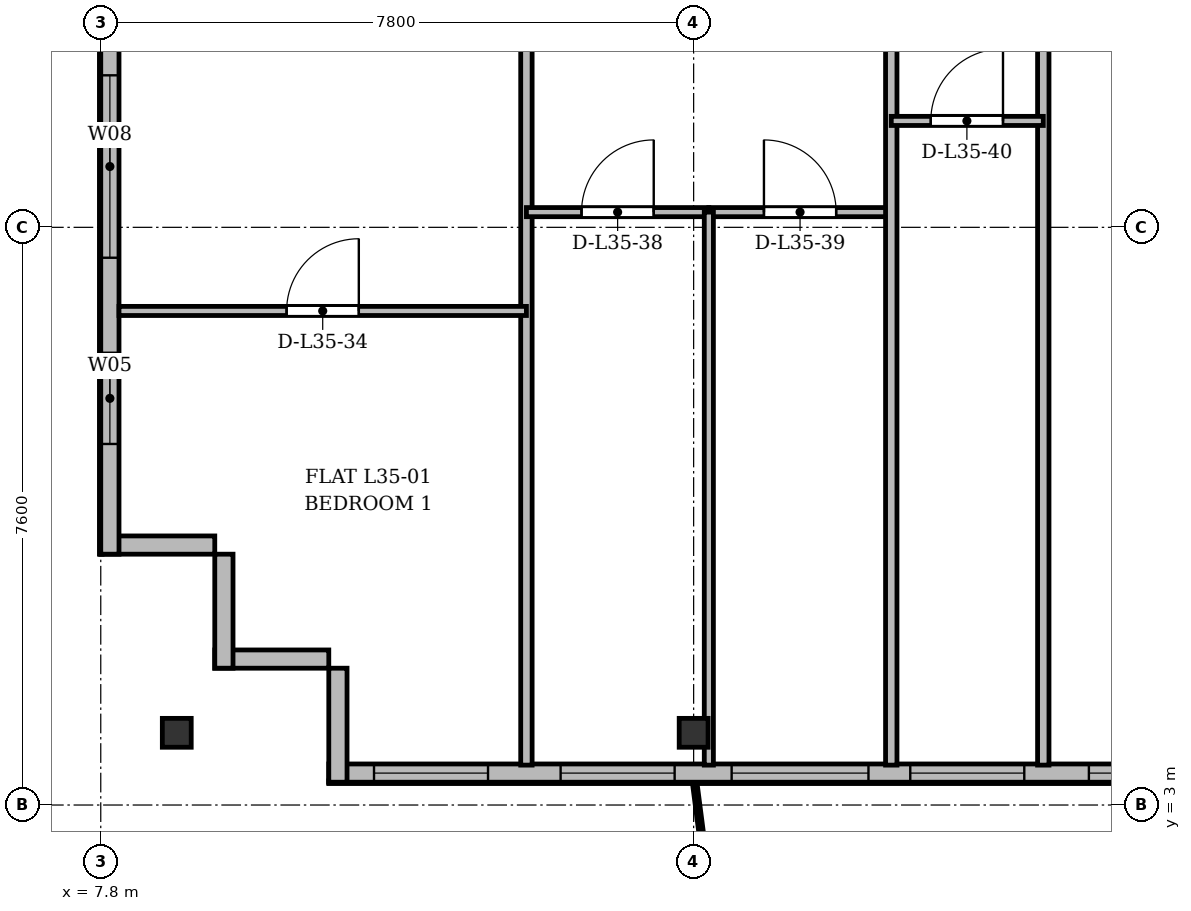
"""IFC4 building model, lengths in metres.
Left out: names, types, materials, properties, quantities, classifications, styles, units other than length and angle.
Written with IfcOpenShell. Run it as: python <this file> out.ifc"""

import sys

from ifc_helpers import new_model, si_unit, direction, frame, frame_2d, origin, origin_2d, place, context, subcontext, project, spatial, rectangle, i_section, extrude, source, transform, mapped, element, fill, save


model = new_model("IFC4")
c1 = context("Model", 3, precision=1e-05, world=origin(), true_north=direction((0.0, 1.0)))
c2 = subcontext(c1, "Body", "Model", "MODEL_VIEW")
j1 = project(units=[si_unit("LENGTHUNIT", "METRE"), si_unit("PLANEANGLEUNIT", "RADIAN")], contexts=[c1])
p1 = place(None, origin())
s1 = spatial("IfcSite", under=j1, at=p1, CompositionType="ELEMENT")
p2 = place(p1, origin())
s2 = spatial("IfcBuilding", under=s1, at=p2, CompositionType="ELEMENT")
p3 = place(p2, frame((0.0, 0.0, 135.7)))
s3 = spatial("IfcBuildingStorey", under=s2, at=p3, CompositionType="ELEMENT", Elevation=135.7)
m1 = source(origin(), c2, "Body", "SweptSolid", [
    extrude(i_section(OverallWidth=0.38, OverallDepth=0.38, WebThickness=0.02, FlangeThickness=0.03, at=origin_2d()), origin(), (0.0, 0.0, 1.0), 3.6),
])
for number, where, z_axis, x_axis in (
    (1, (8.8, 3.95, 0.0), (0.0, 0.0, 1.0), (1.0, 0.0, 0.0)),
    (2, (15.6, 3.95, 0.0), (0.0, 0.0, 1.0), (1.0, 0.0, 0.0)),
):
    element("IfcColumn", number, at=place(p3, frame(where, z_axis=z_axis, x_axis=x_axis)), inside=s3, PredefinedType="COLUMN", context=c2, shape_type="MappedRepresentation", body=[
        mapped(m1, transform((0.0, 0.0, 0.0), x_axis=(1.0, 0.0, 0.0), y_axis=(0.0, 1.0, 0.0), z_axis=(0.0, 0.0, 1.0), scale=1.0)),
    ])
for number, where, z_axis, x_axis in (
    (3, (10.8, 4.92, 0.0), (0.0, 0.0, 1.0), (-1.0, 0.0, 0.0)),
    (4, (9.42, 4.8, 0.0), (0.0, 0.0, 1.0), (0.0, 1.0, 0.0)),
):
    element("IfcWall", number, at=place(p3, frame(where, z_axis=z_axis, x_axis=x_axis)), inside=s3, PredefinedType="SOLIDWALL", context=c2, shape_type="SweptSolid", body=[
        extrude(rectangle(XDim=1.5, YDim=0.24, at=frame_2d((0.75, 0.0))), origin(), (0.0, 0.0, 1.0), 3.35),
    ])
p4 = place(p3, frame((9.3, 6.42, 0.0), z_axis=(0.0, 0.0, 1.0), x_axis=(-1.0, 0.0, 0.0)))
e5 = element("IfcWall", 5, at=p4, inside=s3, PredefinedType="SOLIDWALL", context=c2, shape_type="SweptSolid", body=[
    extrude(rectangle(XDim=1.5, YDim=0.24, at=frame_2d((0.75, 0.0))), origin(), (0.0, 0.0, 1.0), 2.85),
])
p5 = place(p3, frame((7.92, 6.3, 0.0), z_axis=(0.0, 0.0, 1.0), x_axis=(0.0, 1.0, 0.0)))
e6 = element("IfcWall", 6, at=p5, inside=s3, PredefinedType="SOLIDWALL", context=c2, shape_type="SweptSolid", body=[
    extrude(rectangle(XDim=39.2, YDim=0.24, at=frame_2d((19.6, 0.0))), origin(), (0.0, 0.0, 1.0), 3.35),
])
p6 = place(p5, frame((1.45, 0.0, 0.92)))
e7 = element("IfcOpeningElement", 7, at=p6, cuts=e6, PredefinedType="OPENING", context=c2, shape_type="SweptSolid", body=[
    extrude(rectangle(XDim=1.2, YDim=1.65, at=frame_2d((0.6, 0.825))), frame((0.0, 0.13, 0.0), z_axis=(0.0, -1.0, 0.0), x_axis=(1.0, 0.0, 0.0)), (0.0, 0.0, 1.0), 0.26),
])
p7 = place(p5, frame((3.9, 0.0, 0.92)))
e8 = element("IfcOpeningElement", 8, at=p7, cuts=e6, PredefinedType="OPENING", context=c2, shape_type="SweptSolid", body=[
    extrude(rectangle(XDim=2.4, YDim=2.1, at=frame_2d((1.2, 1.05))), frame((0.0, 0.13, 0.0), z_axis=(0.0, -1.0, 0.0), x_axis=(1.0, 0.0, 0.0)), (0.0, 0.0, 1.0), 0.26),
])
p8 = place(p5, frame((8.1, 0.0, 0.92)))
e9 = element("IfcOpeningElement", 9, at=p8, cuts=e6, PredefinedType="OPENING", context=c2, shape_type="SweptSolid", body=[
    extrude(rectangle(XDim=2.4, YDim=2.1, at=frame_2d((1.2, 1.05))), frame((0.0, 0.13, 0.0), z_axis=(0.0, -1.0, 0.0), x_axis=(1.0, 0.0, 0.0)), (0.0, 0.0, 1.0), 0.26),
])
p9 = place(p5, frame((15.3, 0.0, 0.92)))
e10 = element("IfcOpeningElement", 10, at=p9, cuts=e6, PredefinedType="OPENING", context=c2, shape_type="SweptSolid", body=[
    extrude(rectangle(XDim=2.4, YDim=2.1, at=frame_2d((1.2, 1.05))), frame((0.0, 0.13, 0.0), z_axis=(0.0, -1.0, 0.0), x_axis=(1.0, 0.0, 0.0)), (0.0, 0.0, 1.0), 0.26),
])
p10 = place(p5, frame((33.5, 0.0, 0.92)))
e11 = element("IfcOpeningElement", 11, at=p10, cuts=e6, PredefinedType="OPENING", context=c2, shape_type="SweptSolid", body=[
    extrude(rectangle(XDim=1.2, YDim=1.65, at=frame_2d((0.6, 0.825))), frame((0.0, 0.13, 0.0), z_axis=(0.0, -1.0, 0.0), x_axis=(1.0, 0.0, 0.0)), (0.0, 0.0, 1.0), 0.26),
])
p11 = place(p5, frame((36.85, 0.0, 0.92)))
e12 = element("IfcOpeningElement", 12, at=p11, cuts=e6, PredefinedType="OPENING", context=c2, shape_type="SweptSolid", body=[
    extrude(rectangle(XDim=1.2, YDim=1.65, at=frame_2d((0.6, 0.825))), frame((0.0, 0.13, 0.0), z_axis=(0.0, -1.0, 0.0), x_axis=(1.0, 0.0, 0.0)), (0.0, 0.0, 1.0), 0.26),
])
p12 = place(p3, frame((63.6, 3.42, 0.0), z_axis=(0.0, 0.0, 1.0), x_axis=(-1.0, 0.0, 0.0)))
e13 = element("IfcWall", 13, at=p12, inside=s3, PredefinedType="SOLIDWALL", context=c2, shape_type="SweptSolid", body=[
    extrude(rectangle(XDim=52.8, YDim=0.24, at=frame_2d((26.4, 0.0))), origin(), (0.0, 0.0, 1.0), 3.35),
])
p13 = place(p12, frame((0.345, 0.0, 0.9)))
e14 = element("IfcOpeningElement", 14, at=p13, cuts=e13, PredefinedType="OPENING", context=c2, shape_type="SweptSolid", body=[
    extrude(rectangle(XDim=1.8, YDim=1.8, at=frame_2d((0.9, 0.9))), frame((0.0, 0.13, 0.0), z_axis=(0.0, -1.0, 0.0), x_axis=(1.0, 0.0, 0.0)), (0.0, 0.0, 1.0), 0.26),
])
p14 = place(p12, frame((2.9, 0.0, 0.9)))
e15 = element("IfcOpeningElement", 15, at=p14, cuts=e13, PredefinedType="OPENING", context=c2, shape_type="SweptSolid", body=[
    extrude(rectangle(XDim=1.5, YDim=1.75, at=frame_2d((0.75, 0.875))), frame((0.0, 0.13, 0.0), z_axis=(0.0, -1.0, 0.0), x_axis=(1.0, 0.0, 0.0)), (0.0, 0.0, 1.0), 0.26),
])
p15 = place(p12, frame((5.902, 0.0, 0.0)))
e16 = element("IfcOpeningElement", 16, at=p15, cuts=e13, PredefinedType="OPENING", context=c2, shape_type="SweptSolid", body=[
    extrude(rectangle(XDim=1.2, YDim=2.2, at=frame_2d((0.6, 1.1))), frame((0.0, 0.13, 0.0), z_axis=(0.0, -1.0, 0.0), x_axis=(1.0, 0.0, 0.0)), (0.0, 0.0, 1.0), 0.26),
])
p16 = place(p12, frame((7.65, 0.0, 0.9)))
e17 = element("IfcOpeningElement", 17, at=p16, cuts=e13, PredefinedType="OPENING", context=c2, shape_type="SweptSolid", body=[
    extrude(rectangle(XDim=1.5, YDim=1.75, at=frame_2d((0.75, 0.875))), frame((0.0, 0.13, 0.0), z_axis=(0.0, -1.0, 0.0), x_axis=(1.0, 0.0, 0.0)), (0.0, 0.0, 1.0), 0.26),
])
p17 = place(p12, frame((10.175, 0.0, 0.9)))
e18 = element("IfcOpeningElement", 18, at=p17, cuts=e13, PredefinedType="OPENING", context=c2, shape_type="SweptSolid", body=[
    extrude(rectangle(XDim=1.65, YDim=1.85, at=frame_2d((0.825, 0.925))), frame((0.0, 0.13, 0.0), z_axis=(0.0, -1.0, 0.0), x_axis=(1.0, 0.0, 0.0)), (0.0, 0.0, 1.0), 0.26),
])
p18 = place(p12, frame((12.9, 0.0, 0.9)))
e19 = element("IfcOpeningElement", 19, at=p18, cuts=e13, PredefinedType="OPENING", context=c2, shape_type="SweptSolid", body=[
    extrude(rectangle(XDim=1.8, YDim=1.8, at=frame_2d((0.9, 0.9))), frame((0.0, 0.13, 0.0), z_axis=(0.0, -1.0, 0.0), x_axis=(1.0, 0.0, 0.0)), (0.0, 0.0, 1.0), 0.26),
])
p19 = place(p12, frame((15.45, 0.0, 0.9)))
e20 = element("IfcOpeningElement", 20, at=p19, cuts=e13, PredefinedType="OPENING", context=c2, shape_type="SweptSolid", body=[
    extrude(rectangle(XDim=1.5, YDim=1.75, at=frame_2d((0.75, 0.875))), frame((0.0, 0.13, 0.0), z_axis=(0.0, -1.0, 0.0), x_axis=(1.0, 0.0, 0.0)), (0.0, 0.0, 1.0), 0.26),
])
p20 = place(p12, frame((17.85, 0.0, 0.9)))
e21 = element("IfcOpeningElement", 21, at=p20, cuts=e13, PredefinedType="OPENING", context=c2, shape_type="SweptSolid", body=[
    extrude(rectangle(XDim=1.5, YDim=1.75, at=frame_2d((0.75, 0.875))), frame((0.0, 0.13, 0.0), z_axis=(0.0, -1.0, 0.0), x_axis=(1.0, 0.0, 0.0)), (0.0, 0.0, 1.0), 0.26),
])
p21 = place(p12, frame((20.45, 0.0, 0.9)))
e22 = element("IfcOpeningElement", 22, at=p21, cuts=e13, PredefinedType="OPENING", context=c2, shape_type="SweptSolid", body=[
    extrude(rectangle(XDim=2.0, YDim=1.95, at=frame_2d((1.0, 0.975))), frame((0.0, 0.13, 0.0), z_axis=(0.0, -1.0, 0.0), x_axis=(1.0, 0.0, 0.0)), (0.0, 0.0, 1.0), 0.26),
])
p22 = place(p12, frame((23.925, 0.0, 0.9)))
e23 = element("IfcOpeningElement", 23, at=p22, cuts=e13, PredefinedType="OPENING", context=c2, shape_type="SweptSolid", body=[
    extrude(rectangle(XDim=1.65, YDim=1.85, at=frame_2d((0.825, 0.925))), frame((0.0, 0.13, 0.0), z_axis=(0.0, -1.0, 0.0), x_axis=(1.0, 0.0, 0.0)), (0.0, 0.0, 1.0), 0.26),
])
p23 = place(p12, frame((28.8, 0.0, 0.9)))
e24 = element("IfcOpeningElement", 24, at=p23, cuts=e13, PredefinedType="OPENING", context=c2, shape_type="SweptSolid", body=[
    extrude(rectangle(XDim=1.8, YDim=1.8, at=frame_2d((0.9, 0.9))), frame((0.0, 0.13, 0.0), z_axis=(0.0, -1.0, 0.0), x_axis=(1.0, 0.0, 0.0)), (0.0, 0.0, 1.0), 0.26),
])
p24 = place(p12, frame((34.478, 0.0, 0.0)))
e25 = element("IfcOpeningElement", 25, at=p24, cuts=e13, PredefinedType="OPENING", context=c2, shape_type="SweptSolid", body=[
    extrude(rectangle(XDim=1.2, YDim=2.2, at=frame_2d((0.6, 1.1))), frame((0.0, 0.13, 0.0), z_axis=(0.0, -1.0, 0.0), x_axis=(1.0, 0.0, 0.0)), (0.0, 0.0, 1.0), 0.26),
])
p25 = place(p12, frame((37.65, 0.0, 0.9)))
e26 = element("IfcOpeningElement", 26, at=p25, cuts=e13, PredefinedType="OPENING", context=c2, shape_type="SweptSolid", body=[
    extrude(rectangle(XDim=1.5, YDim=1.75, at=frame_2d((0.75, 0.875))), frame((0.0, 0.13, 0.0), z_axis=(0.0, -1.0, 0.0), x_axis=(1.0, 0.0, 0.0)), (0.0, 0.0, 1.0), 0.26),
])
p26 = place(p12, frame((40.8, 0.0, 0.9)))
e27 = element("IfcOpeningElement", 27, at=p26, cuts=e13, PredefinedType="OPENING", context=c2, shape_type="SweptSolid", body=[
    extrude(rectangle(XDim=2.0, YDim=1.95, at=frame_2d((1.0, 0.975))), frame((0.0, 0.13, 0.0), z_axis=(0.0, -1.0, 0.0), x_axis=(1.0, 0.0, 0.0)), (0.0, 0.0, 1.0), 0.26),
])
p27 = place(p12, frame((43.65, 0.0, 0.9)))
e28 = element("IfcOpeningElement", 28, at=p27, cuts=e13, PredefinedType="OPENING", context=c2, shape_type="SweptSolid", body=[
    extrude(rectangle(XDim=1.5, YDim=1.75, at=frame_2d((0.75, 0.875))), frame((0.0, 0.13, 0.0), z_axis=(0.0, -1.0, 0.0), x_axis=(1.0, 0.0, 0.0)), (0.0, 0.0, 1.0), 0.26),
])
p28 = place(p12, frame((45.7, 0.0, 0.9)))
e29 = element("IfcOpeningElement", 29, at=p28, cuts=e13, PredefinedType="OPENING", context=c2, shape_type="SweptSolid", body=[
    extrude(rectangle(XDim=1.8, YDim=1.8, at=frame_2d((0.9, 0.9))), frame((0.0, 0.13, 0.0), z_axis=(0.0, -1.0, 0.0), x_axis=(1.0, 0.0, 0.0)), (0.0, 0.0, 1.0), 0.26),
])
p29 = place(p12, frame((48.25, 0.0, 0.9)))
e30 = element("IfcOpeningElement", 30, at=p29, cuts=e13, PredefinedType="OPENING", context=c2, shape_type="SweptSolid", body=[
    extrude(rectangle(XDim=1.5, YDim=1.75, at=frame_2d((0.75, 0.875))), frame((0.0, 0.13, 0.0), z_axis=(0.0, -1.0, 0.0), x_axis=(1.0, 0.0, 0.0)), (0.0, 0.0, 1.0), 0.26),
])
p30 = place(p12, frame((50.705, 0.0, 0.9)))
e31 = element("IfcOpeningElement", 31, at=p30, cuts=e13, PredefinedType="OPENING", context=c2, shape_type="SweptSolid", body=[
    extrude(rectangle(XDim=1.5, YDim=1.75, at=frame_2d((0.75, 0.875))), frame((0.0, 0.13, 0.0), z_axis=(0.0, -1.0, 0.0), x_axis=(1.0, 0.0, 0.0)), (0.0, 0.0, 1.0), 0.26),
])
p31 = place(p3, frame((10.92, 3.3, 0.0), z_axis=(0.0, 0.0, 1.0), x_axis=(0.0, 1.0, 0.0)))
e32 = element("IfcWall", 32, at=p31, inside=s3, PredefinedType="SOLIDWALL", context=c2, shape_type="SweptSolid", body=[
    extrude(rectangle(XDim=1.5, YDim=0.24, at=frame_2d((0.75, 0.0))), origin(), (0.0, 0.0, 1.0), 2.75),
])
p32 = place(p3, frame((13.4, 3.525, 0.0), z_axis=(0.0, 0.0, 1.0), x_axis=(0.0, 1.0, 0.0)))
e33 = element("IfcWall", 33, at=p32, inside=s3, PredefinedType="PARTITIONING", context=c2, shape_type="SweptSolid", body=[
    extrude(rectangle(XDim=27.275, YDim=0.15, at=frame_2d((13.638, 0.0))), origin(), (0.0, 0.0, 1.0), 2.75),
])
p33 = place(p3, frame((8.04, 9.5, 0.0), z_axis=(0.0, 0.0, 1.0), x_axis=(1.0, 0.0, 0.0)))
e34 = element("IfcWall", 34, at=p33, inside=s3, PredefinedType="PARTITIONING", context=c2, shape_type="SweptSolid", body=[
    extrude(rectangle(XDim=5.36, YDim=0.12, at=frame_2d((2.68, 0.0))), origin(), (0.0, 0.0, 1.0), 2.85),
])
p34 = place(p33, frame((2.205, 0.0, 0.0)))
e35 = element("IfcOpeningElement", 35, at=p34, cuts=e34, PredefinedType="OPENING", context=c2, shape_type="SweptSolid", body=[
    extrude(rectangle(XDim=0.95, YDim=2.15, at=frame_2d((0.475, 1.075))), frame((0.0, 0.07, 0.0), z_axis=(0.0, -1.0, 0.0), x_axis=(1.0, 0.0, 0.0)), (0.0, 0.0, 1.0), 0.14),
])
p35 = place(p3, frame((13.4, 10.8, 0.0), z_axis=(0.0, 0.0, 1.0), x_axis=(1.0, 0.0, 0.0)))
e36 = element("IfcWall", 36, at=p35, inside=s3, PredefinedType="PARTITIONING", context=c2, shape_type="SweptSolid", body=[
    extrude(rectangle(XDim=2.4, YDim=0.12, at=frame_2d((1.2, 0.0))), origin(), (0.0, 0.0, 1.0), 2.85),
])
p36 = place(p35, frame((0.725, 0.0, 0.0)))
e37 = element("IfcOpeningElement", 37, at=p36, cuts=e36, PredefinedType="OPENING", context=c2, shape_type="SweptSolid", body=[
    extrude(rectangle(XDim=0.95, YDim=2.15, at=frame_2d((0.475, 1.075))), frame((0.0, 0.07, 0.0), z_axis=(0.0, -1.0, 0.0), x_axis=(1.0, 0.0, 0.0)), (0.0, 0.0, 1.0), 0.14),
])
p37 = place(p3, frame((15.8, 10.8, 0.0), z_axis=(0.0, 0.0, 1.0), x_axis=(1.0, 0.0, 0.0)))
e38 = element("IfcWall", 38, at=p37, inside=s3, PredefinedType="PARTITIONING", context=c2, shape_type="SweptSolid", body=[
    extrude(rectangle(XDim=2.4, YDim=0.12, at=frame_2d((1.2, 0.0))), origin(), (0.0, 0.0, 1.0), 3.0),
])
p38 = place(p37, frame((0.725, 0.0, 0.0)))
e39 = element("IfcOpeningElement", 39, at=p38, cuts=e38, PredefinedType="OPENING", context=c2, shape_type="SweptSolid", body=[
    extrude(rectangle(XDim=0.95, YDim=2.15, at=frame_2d((0.475, 1.075))), frame((0.0, 0.07, 0.0), z_axis=(0.0, -1.0, 0.0), x_axis=(1.0, 0.0, 0.0)), (0.0, 0.0, 1.0), 0.14),
])
p39 = place(p3, frame((15.8, 3.525, 0.0), z_axis=(0.0, 0.0, 1.0), x_axis=(0.0, 1.0, 0.0)))
e40 = element("IfcWall", 40, at=p39, inside=s3, PredefinedType="PARTITIONING", context=c2, shape_type="SweptSolid", body=[
    extrude(rectangle(XDim=7.275, YDim=0.12, at=frame_2d((3.638, 0.0))), origin(), (0.0, 0.0, 1.0), 2.75),
])
for number, where, z_axis, x_axis in (
    (41, (18.2, 3.525, 0.0), (0.0, 0.0, 1.0), (0.0, 1.0, 0.0)),
    (42, (20.2, 3.525, 0.0), (0.0, 0.0, 1.0), (0.0, 1.0, 0.0)),
):
    element("IfcWall", number, at=place(p3, frame(where, z_axis=z_axis, x_axis=x_axis)), inside=s3, PredefinedType="PARTITIONING", context=c2, shape_type="SweptSolid", body=[
        extrude(rectangle(XDim=27.275, YDim=0.15, at=frame_2d((13.638, 0.0))), origin(), (0.0, 0.0, 1.0), 2.75),
    ])
p40 = place(p3, frame((18.2, 12.0, 0.0), z_axis=(0.0, 0.0, 1.0), x_axis=(1.0, 0.0, 0.0)))
e43 = element("IfcWall", 43, at=p40, inside=s3, PredefinedType="PARTITIONING", context=c2, shape_type="SweptSolid", body=[
    extrude(rectangle(XDim=2.0, YDim=0.12, at=frame_2d((1.0, 0.0))), origin(), (0.0, 0.0, 1.0), 3.35),
])
p41 = place(p40, frame((0.52, 0.0, 0.0)))
e44 = element("IfcOpeningElement", 44, at=p41, cuts=e43, PredefinedType="OPENING", context=c2, shape_type="SweptSolid", body=[
    extrude(rectangle(XDim=0.95, YDim=2.15, at=frame_2d((0.475, 1.075))), frame((0.0, 0.07, 0.0), z_axis=(0.0, -1.0, 0.0), x_axis=(1.0, 0.0, 0.0)), (0.0, 0.0, 1.0), 0.14),
])
m2 = source(origin(), c2, "Body", "SweptSolid", [
    extrude(rectangle(XDim=1.2, YDim=1.65, at=frame_2d((0.6, 0.825))), frame((0.0, 0.03, 0.0), z_axis=(0.0, -1.0, 0.0), x_axis=(1.0, 0.0, 0.0)), (0.0, 0.0, 1.0), 0.06),
])
p42 = place(p6, origin())
e45 = element("IfcWindow", 45, at=p42, inside=s3, PartitioningType="SINGLE_PANEL", PredefinedType="WINDOW", context=c2, shape_type="MappedRepresentation", body=[
    mapped(m2, transform((0.0, 0.0, 0.0), x_axis=(1.0, 0.0, 0.0), y_axis=(0.0, 1.0, 0.0), z_axis=(0.0, 0.0, 1.0), scale=1.0)),
])
fill(e7, e45)
m3 = source(origin(), c2, "Body", "SweptSolid", [
    extrude(rectangle(XDim=2.4, YDim=2.1, at=frame_2d((1.2, 1.05))), frame((0.0, 0.03, 0.0), z_axis=(0.0, -1.0, 0.0), x_axis=(1.0, 0.0, 0.0)), (0.0, 0.0, 1.0), 0.06),
])
p43 = place(p7, origin())
e46 = element("IfcWindow", 46, at=p43, inside=s3, PartitioningType="SINGLE_PANEL", PredefinedType="WINDOW", context=c2, shape_type="MappedRepresentation", body=[
    mapped(m3, transform((0.0, 0.0, 0.0), x_axis=(1.0, 0.0, 0.0), y_axis=(0.0, 1.0, 0.0), z_axis=(0.0, 0.0, 1.0), scale=1.0)),
])
fill(e8, e46)
m4 = source(origin(), c2, "Body", "SweptSolid", [
    extrude(rectangle(XDim=2.0, YDim=1.95, at=frame_2d((1.0, 0.975))), frame((0.0, 0.03, 0.0), z_axis=(0.0, -1.0, 0.0), x_axis=(1.0, 0.0, 0.0)), (0.0, 0.0, 1.0), 0.06),
])
p44 = place(p26, origin())
e47 = element("IfcWindow", 47, at=p44, inside=s3, PartitioningType="SINGLE_PANEL", PredefinedType="WINDOW", context=c2, shape_type="MappedRepresentation", body=[
    mapped(m4, transform((0.0, 0.0, 0.0), x_axis=(1.0, 0.0, 0.0), y_axis=(0.0, 1.0, 0.0), z_axis=(0.0, 0.0, 1.0), scale=1.0)),
])
fill(e27, e47)
m5 = source(origin(), c2, "Body", "SweptSolid", [
    extrude(rectangle(XDim=1.5, YDim=1.75, at=frame_2d((0.75, 0.875))), frame((0.0, 0.03, 0.0), z_axis=(0.0, -1.0, 0.0), x_axis=(1.0, 0.0, 0.0)), (0.0, 0.0, 1.0), 0.06),
])
p45 = place(p27, origin())
e48 = element("IfcWindow", 48, at=p45, inside=s3, PartitioningType="SINGLE_PANEL", PredefinedType="WINDOW", context=c2, shape_type="MappedRepresentation", body=[
    mapped(m5, transform((0.0, 0.0, 0.0), x_axis=(1.0, 0.0, 0.0), y_axis=(0.0, 1.0, 0.0), z_axis=(0.0, 0.0, 1.0), scale=1.0)),
])
fill(e28, e48)
m6 = source(origin(), c2, "Body", "SweptSolid", [
    extrude(rectangle(XDim=1.8, YDim=1.8, at=frame_2d((0.9, 0.9))), frame((0.0, 0.03, 0.0), z_axis=(0.0, -1.0, 0.0), x_axis=(1.0, 0.0, 0.0)), (0.0, 0.0, 1.0), 0.06),
])
p46 = place(p28, origin())
e49 = element("IfcWindow", 49, at=p46, inside=s3, PartitioningType="SINGLE_PANEL", PredefinedType="WINDOW", context=c2, shape_type="MappedRepresentation", body=[
    mapped(m6, transform((0.0, 0.0, 0.0), x_axis=(1.0, 0.0, 0.0), y_axis=(0.0, 1.0, 0.0), z_axis=(0.0, 0.0, 1.0), scale=1.0)),
])
fill(e29, e49)
p47 = place(p29, origin())
e50 = element("IfcWindow", 50, at=p47, inside=s3, PartitioningType="SINGLE_PANEL", PredefinedType="WINDOW", context=c2, shape_type="MappedRepresentation", body=[
    mapped(m5, transform((0.0, 0.0, 0.0), x_axis=(1.0, 0.0, 0.0), y_axis=(0.0, 1.0, 0.0), z_axis=(0.0, 0.0, 1.0), scale=1.0)),
])
fill(e30, e50)
p48 = place(p30, origin())
e51 = element("IfcWindow", 51, at=p48, inside=s3, PartitioningType="SINGLE_PANEL", PredefinedType="WINDOW", context=c2, shape_type="MappedRepresentation", body=[
    mapped(m5, transform((0.0, 0.0, 0.0), x_axis=(1.0, 0.0, 0.0), y_axis=(0.0, 1.0, 0.0), z_axis=(0.0, 0.0, 1.0), scale=1.0)),
])
fill(e31, e51)
m7 = source(origin(), c2, "Body", "SweptSolid", [
    extrude(rectangle(XDim=0.95, YDim=2.15, at=frame_2d((0.475, 1.075))), frame((0.0, 0.025, 0.0), z_axis=(0.0, -1.0, 0.0), x_axis=(1.0, 0.0, 0.0)), (0.0, 0.0, 1.0), 0.05),
])
p49 = place(p34, origin())
e52 = element("IfcDoor", 52, at=p49, inside=s3, OperationType="SINGLE_SWING_RIGHT", PredefinedType="DOOR", context=c2, shape_type="MappedRepresentation", body=[
    mapped(m7, transform((0.0, 0.0, 0.0), x_axis=(1.0, 0.0, 0.0), y_axis=(0.0, 1.0, 0.0), z_axis=(0.0, 0.0, 1.0), scale=1.0)),
])
fill(e35, e52)
p50 = place(p36, origin())
e53 = element("IfcDoor", 53, at=p50, inside=s3, OperationType="SINGLE_SWING_RIGHT", PredefinedType="DOOR", context=c2, shape_type="MappedRepresentation", body=[
    mapped(m7, transform((0.0, 0.0, 0.0), x_axis=(1.0, 0.0, 0.0), y_axis=(0.0, 1.0, 0.0), z_axis=(0.0, 0.0, 1.0), scale=1.0)),
])
fill(e37, e53)
p51 = place(p38, origin())
e54 = element("IfcDoor", 54, at=p51, inside=s3, OperationType="SINGLE_SWING_LEFT", PredefinedType="DOOR", context=c2, shape_type="MappedRepresentation", body=[
    mapped(m7, transform((0.0, 0.0, 0.0), x_axis=(1.0, 0.0, 0.0), y_axis=(0.0, 1.0, 0.0), z_axis=(0.0, 0.0, 1.0), scale=1.0)),
])
fill(e39, e54)
p52 = place(p41, origin())
e55 = element("IfcDoor", 55, at=p52, inside=s3, OperationType="SINGLE_SWING_RIGHT", PredefinedType="DOOR", context=c2, shape_type="MappedRepresentation", body=[
    mapped(m7, transform((0.0, 0.0, 0.0), x_axis=(1.0, 0.0, 0.0), y_axis=(0.0, 1.0, 0.0), z_axis=(0.0, 0.0, 1.0), scale=1.0)),
])
fill(e44, e55)
save(model, sys.argv[1])
